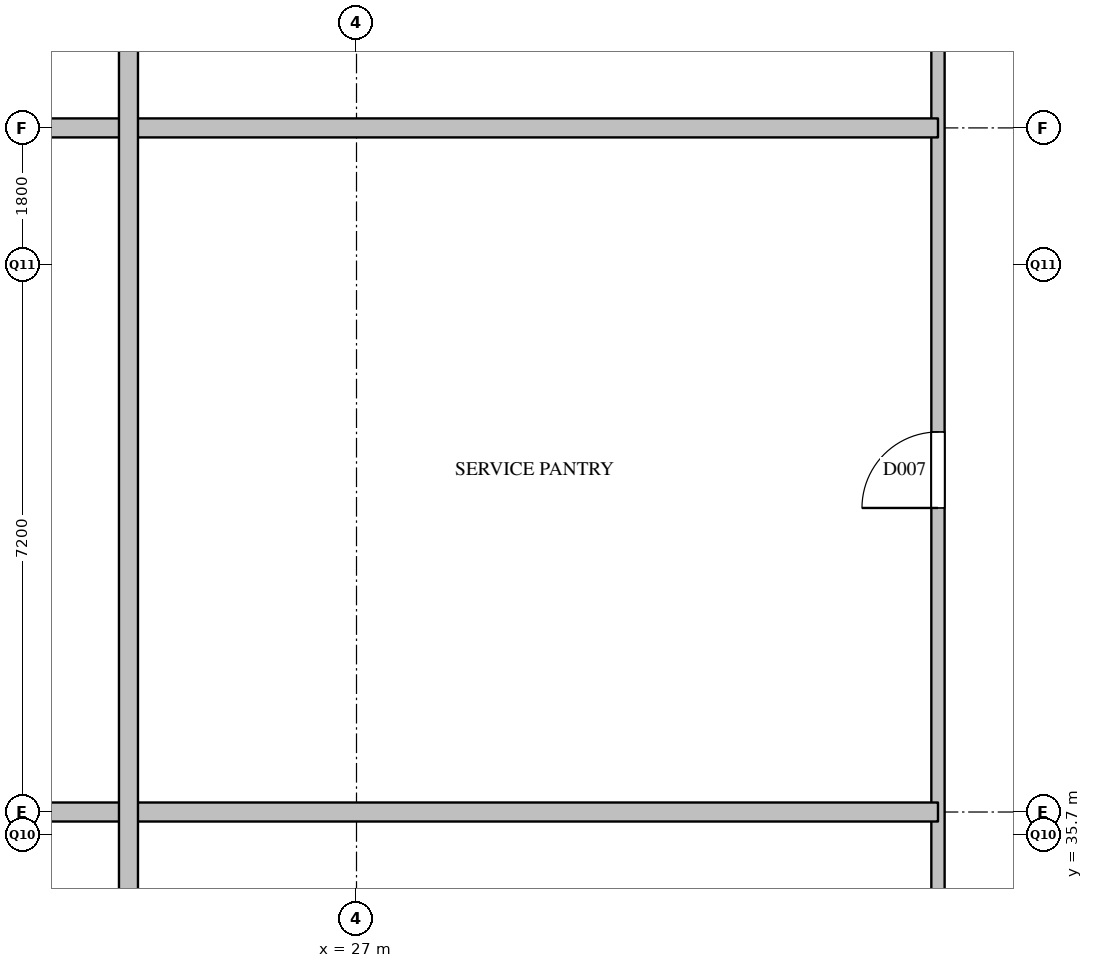
"""IFC4 building model, lengths in metres.
Left out: names, types, materials, properties, quantities, classifications, styles, units other than length and angle.
Written with IfcOpenShell. Run it as: python <this file> out.ifc"""

import sys

from ifc_helpers import new_model, si_unit, direction, frame, frame_2d, origin, place, context, subcontext, project, spatial, rectangle, extrude, element, fill, save


model = new_model("IFC4")
c1 = context("Model", 3, precision=1e-05, world=origin(), true_north=direction((0.0, 1.0)))
c2 = subcontext(c1, "Body", "Model", "MODEL_VIEW")
j1 = project(units=[si_unit("LENGTHUNIT", "METRE"), si_unit("PLANEANGLEUNIT", "RADIAN")], contexts=[c1])
p1 = place(None, origin())
s1 = spatial("IfcSite", under=j1, at=p1, CompositionType="ELEMENT")
p2 = place(p1, origin())
s2 = spatial("IfcBuilding", under=s1, at=p2, CompositionType="ELEMENT")
p3 = place(p2, frame((0.0, 0.0, 226.7)))
s3 = spatial("IfcBuildingStorey", under=s2, at=p3, CompositionType="ELEMENT", Elevation=226.7)
p4 = place(p3, frame((34.65, 28.5, 0.0), z_axis=(0.0, 0.0, 1.0), x_axis=(0.0, 1.0, 0.0)))
e1 = element("IfcWall", 1, at=p4, inside=s3, PredefinedType="PARTITIONING", context=c2, shape_type="SweptSolid", body=[
    extrude(rectangle(XDim=22.85, YDim=0.175, at=frame_2d((11.425, 0.0))), origin(), (0.0, 0.0, 1.0), 3.5),
])
p5 = place(p4, frame((3.3, 0.0, 0.0)))
e2 = element("IfcOpeningElement", 2, at=p5, cuts=e1, PredefinedType="OPENING", context=c2, shape_type="SweptSolid", body=[
    extrude(rectangle(XDim=0.9, YDim=2.1, at=frame_2d((0.45, 1.05))), frame((0.0, 0.097, 0.0), z_axis=(0.0, -1.0, 0.0), x_axis=(1.0, 0.0, 0.0)), (0.0, 0.0, 1.0), 0.195),
])
p6 = place(p4, frame((11.5, 0.0, 0.0)))
e3 = element("IfcOpeningElement", 3, at=p6, cuts=e1, PredefinedType="OPENING", context=c2, shape_type="SweptSolid", body=[
    extrude(rectangle(XDim=1.0, YDim=2.1, at=frame_2d((0.5, 1.05))), frame((0.0, 0.097, 0.0), z_axis=(0.0, -1.0, 0.0), x_axis=(1.0, 0.0, 0.0)), (0.0, 0.0, 1.0), 0.195),
])
p7 = place(p4, frame((19.225, 0.0, 0.0)))
e4 = element("IfcOpeningElement", 4, at=p7, cuts=e1, PredefinedType="OPENING", context=c2, shape_type="SweptSolid", body=[
    extrude(rectangle(XDim=0.9, YDim=2.1, at=frame_2d((0.45, 1.05))), frame((0.0, 0.097, 0.0), z_axis=(0.0, -1.0, 0.0), x_axis=(1.0, 0.0, 0.0)), (0.0, 0.0, 1.0), 0.195),
])
for number, where, z_axis, x_axis in (
    (5, (19.35, 36.0, 0.0), (0.0, 0.0, 1.0), (1.0, 0.0, 0.0)),
    (6, (19.35, 45.0, 0.0), (0.0, 0.0, 1.0), (1.0, 0.0, 0.0)),
):
    element("IfcWall", number, at=place(p3, frame(where, z_axis=z_axis, x_axis=x_axis)), inside=s3, PredefinedType="PARTITIONING", context=c2, shape_type="SweptSolid", body=[
        extrude(rectangle(XDim=15.3, YDim=0.25, at=frame_2d((7.65, 0.0))), origin(), (0.0, 0.0, 1.0), 3.5),
    ])
p8 = place(p3, frame((24.0, 27.0, 0.0), z_axis=(0.0, 0.0, 1.0), x_axis=(0.0, 1.0, 0.0)))
e7 = element("IfcWall", 7, at=p8, inside=s3, PredefinedType="PARTITIONING", context=c2, shape_type="SweptSolid", body=[
    extrude(rectangle(XDim=27.0, YDim=0.25, at=frame_2d((13.5, 0.0))), origin(), (0.0, 0.0, 1.0), 3.5),
])
p9 = place(p6, origin())
e8 = element("IfcDoor", 8, at=p9, inside=s3, OperationType="SINGLE_SWING_LEFT", PredefinedType="DOOR", context=c2, shape_type="SweptSolid", body=[
    extrude(rectangle(XDim=1.0, YDim=2.1, at=frame_2d((0.5, 1.05))), frame((0.0, 0.025, 0.0), z_axis=(0.0, -1.0, 0.0), x_axis=(1.0, 0.0, 0.0)), (0.0, 0.0, 1.0), 0.05),
])
fill(e3, e8)
save(model, sys.argv[1])
